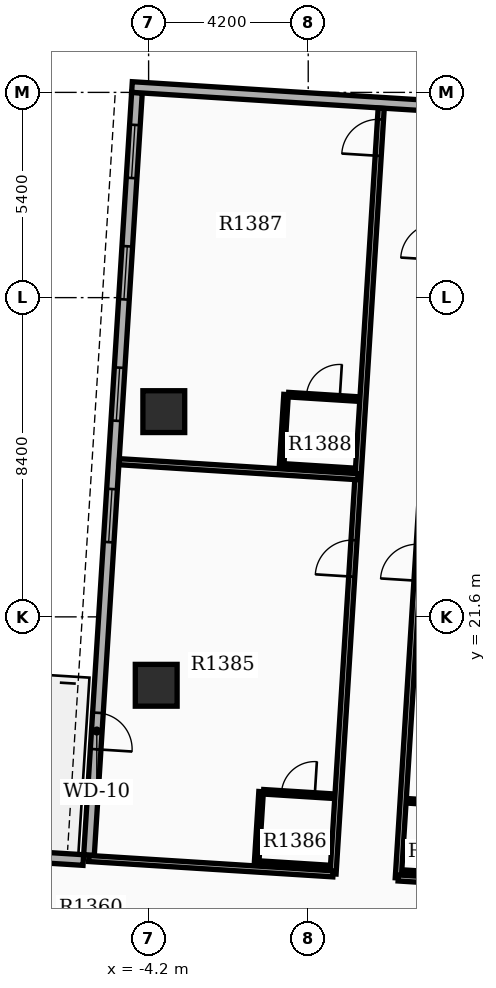
"""IFC4 building model, lengths in metres.
Left out: names, types, materials, properties, quantities, classifications, styles, units other than length and angle.
Written with IfcOpenShell. Run it as: python <this file> out.ifc"""

import sys

from ifc_helpers import new_model, si_unit, direction, frame, frame_2d, origin, origin_2d, place, context, subcontext, project, spatial, rectangle, extrude, element, fill, save


model = new_model("IFC4")
c1 = context("Model", 3, precision=1e-05, world=origin(), true_north=direction((0.0, 1.0)))
c2 = subcontext(c1, "Body", "Model", "MODEL_VIEW")
j1 = project(units=[si_unit("LENGTHUNIT", "METRE"), si_unit("PLANEANGLEUNIT", "RADIAN")], contexts=[c1])
p1 = place(None, origin())
s1 = spatial("IfcSite", under=j1, at=p1, CompositionType="ELEMENT")
p2 = place(p1, origin())
s2 = spatial("IfcBuilding", under=s1, at=p2, CompositionType="ELEMENT")
p3 = place(p2, frame((0.0, 0.0, 87.3)))
s3 = spatial("IfcBuildingStorey", under=s2, at=p3, CompositionType="ELEMENT", Elevation=87.3)
for number, where, z_axis, x_axis in (
    (1, (-4.0, 19.8, 0.0), (0.0, 0.0, 1.0), (1.0, 0.0, 0.0)),
    (2, (-3.8, 27.0, 0.0), (0.0, 0.0, 1.0), (1.0, 0.0, 0.0)),
):
    element("IfcColumn", number, at=place(p3, frame(where, z_axis=z_axis, x_axis=x_axis)), inside=s3, PredefinedType="COLUMN", context=c2, shape_type="SweptSolid", body=[
        extrude(rectangle(XDim=1.1, YDim=1.1, at=origin_2d()), origin(), (0.0, 0.0, 1.0), 3.9),
    ])
p4 = place(p3, frame((-4.507, 35.393, 0.0), z_axis=(0.0, 0.0, 1.0), x_axis=(-0.062784355807, -0.998027116198, 0.0)))
e3 = element("IfcWall", 3, at=p4, inside=s3, PredefinedType="STANDARD", context=c2, shape_type="SweptSolid", body=[
    extrude(rectangle(XDim=20.1, YDim=0.28, at=frame_2d((10.05, 0.0))), origin(), (0.0, 0.0, 1.0), 2.91),
])
p5 = place(p4, frame((0.85, 0.0, 0.8)))
e4 = element("IfcOpeningElement", 4, at=p5, cuts=e3, PredefinedType="OPENING", context=c2, shape_type="SweptSolid", body=[
    extrude(rectangle(XDim=1.4, YDim=1.6, at=frame_2d((0.7, 0.8))), frame((0.0, 0.15, 0.0), z_axis=(0.0, -1.0, 0.0), x_axis=(1.0, 0.0, 0.0)), (0.0, 0.0, 1.0), 0.3),
])
p6 = place(p4, frame((4.05, 0.0, 0.8)))
e5 = element("IfcOpeningElement", 5, at=p6, cuts=e3, PredefinedType="OPENING", context=c2, shape_type="SweptSolid", body=[
    extrude(rectangle(XDim=1.4, YDim=1.6, at=frame_2d((0.7, 0.8))), frame((0.0, 0.15, 0.0), z_axis=(0.0, -1.0, 0.0), x_axis=(1.0, 0.0, 0.0)), (0.0, 0.0, 1.0), 0.3),
])
p7 = place(p4, frame((7.25, 0.0, 0.8)))
e6 = element("IfcOpeningElement", 6, at=p7, cuts=e3, PredefinedType="OPENING", context=c2, shape_type="SweptSolid", body=[
    extrude(rectangle(XDim=1.4, YDim=1.6, at=frame_2d((0.7, 0.8))), frame((0.0, 0.15, 0.0), z_axis=(0.0, -1.0, 0.0), x_axis=(1.0, 0.0, 0.0)), (0.0, 0.0, 1.0), 0.3),
])
p8 = place(p4, frame((10.45, 0.0, 0.8)))
e7 = element("IfcOpeningElement", 7, at=p8, cuts=e3, PredefinedType="OPENING", context=c2, shape_type="SweptSolid", body=[
    extrude(rectangle(XDim=1.4, YDim=1.6, at=frame_2d((0.7, 0.8))), frame((0.0, 0.15, 0.0), z_axis=(0.0, -1.0, 0.0), x_axis=(1.0, 0.0, 0.0)), (0.0, 0.0, 1.0), 0.3),
])
p9 = place(p4, frame((16.35, 0.0, 0.0)))
e8 = element("IfcOpeningElement", 8, at=p9, cuts=e3, PredefinedType="OPENING", context=c2, shape_type="SweptSolid", body=[
    extrude(rectangle(XDim=0.96, YDim=2.1, at=frame_2d((0.48, 1.05))), frame((0.0, 0.15, 0.0), z_axis=(0.0, -1.0, 0.0), x_axis=(1.0, 0.0, 0.0)), (0.0, 0.0, 1.0), 0.3),
])
p10 = place(p3, frame((9.055, 34.68, 0.0), z_axis=(0.0, 0.0, 1.0), x_axis=(-0.998026318072, 0.062797041623, 0.0)))
e9 = element("IfcWall", 9, at=p10, inside=s3, PredefinedType="STANDARD", context=c2, shape_type="SweptSolid", body=[
    extrude(rectangle(XDim=13.72, YDim=0.28, at=frame_2d((6.86, 0.0))), origin(), (0.0, 0.0, 1.0), 2.91),
])
p11 = place(p10, frame((0.85, 0.0, 0.85)))
e10 = element("IfcOpeningElement", 10, at=p11, cuts=e9, PredefinedType="OPENING", context=c2, shape_type="SweptSolid", body=[
    extrude(rectangle(XDim=1.0, YDim=1.5, at=frame_2d((0.5, 0.75))), frame((0.0, 0.15, 0.0), z_axis=(0.0, -1.0, 0.0), x_axis=(1.0, 0.0, 0.0)), (0.0, 0.0, 1.0), 0.3),
])
p12 = place(p3, frame((-12.205, 15.597, 0.0), z_axis=(0.0, 0.0, 1.0), x_axis=(0.998024885752, -0.062819801181, 0.0)))
e11 = element("IfcWall", 11, at=p12, inside=s3, PredefinedType="STANDARD", context=c2, shape_type="SweptSolid", body=[
    extrude(rectangle(XDim=6.3, YDim=0.28, at=frame_2d((3.15, 0.0))), origin(), (0.0, 0.0, 1.0), 2.91),
])
p13 = place(p3, frame((2.37, 14.73, 0.0), z_axis=(0.0, 0.0, 1.0), x_axis=(0.062783460104, 0.998027172545, 0.0)))
e12 = element("IfcWall", 12, at=p13, inside=s3, PredefinedType="PARTITIONING", context=c2, shape_type="SweptSolid", body=[
    extrude(rectangle(XDim=20.182, YDim=0.16, at=frame_2d((10.091, 0.0))), origin(), (0.0, 0.0, 1.0), 2.9),
])
p14 = place(p13, frame((7.836, 0.0, 0.0)))
e13 = element("IfcOpeningElement", 13, at=p14, cuts=e12, PredefinedType="OPENING", context=c2, shape_type="SweptSolid", body=[
    extrude(rectangle(XDim=0.96, YDim=2.15, at=frame_2d((0.48, 1.075))), frame((0.0, 0.09, 0.0), z_axis=(0.0, -1.0, 0.0), x_axis=(1.0, 0.0, 0.0)), (0.0, 0.0, 1.0), 0.18),
])
p15 = place(p13, frame((16.296, 0.0, 0.0)))
e14 = element("IfcOpeningElement", 14, at=p15, cuts=e12, PredefinedType="OPENING", context=c2, shape_type="SweptSolid", body=[
    extrude(rectangle(XDim=0.96, YDim=2.15, at=frame_2d((0.48, 1.075))), frame((0.0, 0.09, 0.0), z_axis=(0.0, -1.0, 0.0), x_axis=(1.0, 0.0, 0.0)), (0.0, 0.0, 1.0), 0.18),
])
p16 = place(p3, frame((2.37, 14.73, 0.0), z_axis=(0.0, 0.0, 1.0), x_axis=(0.998026584059, -0.062792814175, 0.0)))
e15 = element("IfcWall", 15, at=p16, inside=s3, PredefinedType="PARTITIONING", context=c2, shape_type="SweptSolid", body=[
    extrude(rectangle(XDim=5.28, YDim=0.16, at=frame_2d((2.64, 0.0))), origin(), (0.0, 0.0, 1.0), 2.9),
])
p17 = place(p3, frame((2.637, 16.758, 0.0), z_axis=(0.0, 0.0, 1.0), x_axis=(0.998027443946, -0.062779145668, 0.0)))
e16 = element("IfcWall", 16, at=p17, inside=s3, PredefinedType="PARTITIONING", context=c2, shape_type="SweptSolid", body=[
    extrude(rectangle(XDim=1.82, YDim=0.12, at=frame_2d((0.91, 0.0))), origin(), (0.0, 0.0, 1.0), 2.9),
])
p18 = place(p17, frame((0.47, 0.0, 0.0)))
e17 = element("IfcOpeningElement", 17, at=p18, cuts=e16, PredefinedType="OPENING", context=c2, shape_type="SweptSolid", body=[
    extrude(rectangle(XDim=0.88, YDim=2.1, at=frame_2d((0.44, 1.05))), frame((0.0, 0.07, 0.0), z_axis=(0.0, -1.0, 0.0), x_axis=(1.0, 0.0, 0.0)), (0.0, 0.0, 1.0), 0.14),
])
p19 = place(p3, frame((2.519, 14.881, 0.0), z_axis=(0.0, 0.0, 1.0), x_axis=(0.998027443946, -0.062779145668, 0.0)))
e18 = element("IfcWall", 18, at=p19, inside=s3, PredefinedType="PARTITIONING", context=c2, shape_type="SweptSolid", body=[
    extrude(rectangle(XDim=1.82, YDim=0.12, at=frame_2d((0.91, 0.0))), origin(), (0.0, 0.0, 1.0), 2.9),
])
p20 = place(p3, frame((0.653, 14.838, 0.0), z_axis=(0.0, 0.0, 1.0), x_axis=(0.062783460104, 0.998027172545, 0.0)))
e19 = element("IfcWall", 19, at=p20, inside=s3, PredefinedType="PARTITIONING", context=c2, shape_type="SweptSolid", body=[
    extrude(rectangle(XDim=20.182, YDim=0.16, at=frame_2d((10.091, 0.0))), origin(), (0.0, 0.0, 1.0), 2.9),
])
p21 = place(p20, frame((7.836, 0.0, 0.0)))
e20 = element("IfcOpeningElement", 20, at=p21, cuts=e19, PredefinedType="OPENING", context=c2, shape_type="SweptSolid", body=[
    extrude(rectangle(XDim=0.96, YDim=2.15, at=frame_2d((0.48, 1.075))), frame((0.0, 0.09, 0.0), z_axis=(0.0, -1.0, 0.0), x_axis=(1.0, 0.0, 0.0)), (0.0, 0.0, 1.0), 0.18),
])
p22 = place(p20, frame((18.93, 0.0, 0.0)))
e21 = element("IfcOpeningElement", 21, at=p22, cuts=e19, PredefinedType="OPENING", context=c2, shape_type="SweptSolid", body=[
    extrude(rectangle(XDim=0.96, YDim=2.15, at=frame_2d((0.48, 1.075))), frame((0.0, 0.09, 0.0), z_axis=(0.0, -1.0, 0.0), x_axis=(1.0, 0.0, 0.0)), (0.0, 0.0, 1.0), 0.18),
])
p23 = place(p3, frame((0.653, 14.838, 0.0), z_axis=(0.0, 0.0, 1.0), x_axis=(-0.998027570366, 0.062777135888, 0.0)))
e22 = element("IfcWall", 22, at=p23, inside=s3, PredefinedType="PARTITIONING", context=c2, shape_type="SweptSolid", body=[
    extrude(rectangle(XDim=6.44, YDim=0.16, at=frame_2d((3.22, 0.0))), origin(), (0.0, 0.0, 1.0), 2.9),
])
p24 = place(p3, frame((1.31, 25.288, 0.0), z_axis=(0.0, 0.0, 1.0), x_axis=(-0.998027283173, 0.062781701496, 0.0)))
e23 = element("IfcWall", 23, at=p24, inside=s3, PredefinedType="PARTITIONING", context=c2, shape_type="SweptSolid", body=[
    extrude(rectangle(XDim=6.292, YDim=0.16, at=frame_2d((3.146, 0.0))), origin(), (0.0, 0.0, 1.0), 2.9),
])
p25 = place(p3, frame((-1.175, 16.997, 0.0), z_axis=(0.0, 0.0, 1.0), x_axis=(0.998027443946, -0.062779145668, 0.0)))
e24 = element("IfcWall", 24, at=p25, inside=s3, PredefinedType="PARTITIONING", context=c2, shape_type="SweptSolid", body=[
    extrude(rectangle(XDim=1.82, YDim=0.12, at=frame_2d((0.91, 0.0))), origin(), (0.0, 0.0, 1.0), 2.9),
])
p26 = place(p25, frame((0.47, 0.0, 0.0)))
e25 = element("IfcOpeningElement", 25, at=p26, cuts=e24, PredefinedType="OPENING", context=c2, shape_type="SweptSolid", body=[
    extrude(rectangle(XDim=0.88, YDim=2.1, at=frame_2d((0.44, 1.05))), frame((0.0, 0.07, 0.0), z_axis=(0.0, -1.0, 0.0), x_axis=(1.0, 0.0, 0.0)), (0.0, 0.0, 1.0), 0.14),
])
p27 = place(p3, frame((-1.293, 15.121, 0.0), z_axis=(0.0, 0.0, 1.0), x_axis=(0.998027443946, -0.062779145668, 0.0)))
e26 = element("IfcWall", 26, at=p27, inside=s3, PredefinedType="PARTITIONING", context=c2, shape_type="SweptSolid", body=[
    extrude(rectangle(XDim=1.82, YDim=0.12, at=frame_2d((0.91, 0.0))), origin(), (0.0, 0.0, 1.0), 2.9),
])
p28 = place(p3, frame((-1.358, 15.125, 0.0), z_axis=(0.0, 0.0, 1.0), x_axis=(0.062717813936, 0.998031300018, 0.0)))
e27 = element("IfcWall", 27, at=p28, inside=s3, PredefinedType="PARTITIONING", context=c2, shape_type="SweptSolid", body=[
    extrude(rectangle(XDim=1.88, YDim=0.12, at=frame_2d((0.94, 0.0))), origin(), (0.0, 0.0, 1.0), 2.9),
])
p29 = place(p3, frame((-0.518, 27.447, 0.0), z_axis=(0.0, 0.0, 1.0), x_axis=(0.998027443946, -0.062779145668, 0.0)))
e28 = element("IfcWall", 28, at=p29, inside=s3, PredefinedType="PARTITIONING", context=c2, shape_type="SweptSolid", body=[
    extrude(rectangle(XDim=1.82, YDim=0.12, at=frame_2d((0.91, 0.0))), origin(), (0.0, 0.0, 1.0), 2.9),
])
p30 = place(p29, frame((0.47, 0.0, 0.0)))
e29 = element("IfcOpeningElement", 29, at=p30, cuts=e28, PredefinedType="OPENING", context=c2, shape_type="SweptSolid", body=[
    extrude(rectangle(XDim=0.88, YDim=2.1, at=frame_2d((0.44, 1.05))), frame((0.0, 0.07, 0.0), z_axis=(0.0, -1.0, 0.0), x_axis=(1.0, 0.0, 0.0)), (0.0, 0.0, 1.0), 0.14),
])
p31 = place(p3, frame((-0.636, 25.57, 0.0), z_axis=(0.0, 0.0, 1.0), x_axis=(0.998027443946, -0.062779145668, 0.0)))
e30 = element("IfcWall", 30, at=p31, inside=s3, PredefinedType="PARTITIONING", context=c2, shape_type="SweptSolid", body=[
    extrude(rectangle(XDim=1.82, YDim=0.12, at=frame_2d((0.91, 0.0))), origin(), (0.0, 0.0, 1.0), 2.9),
])
p32 = place(p3, frame((-0.7, 25.574, 0.0), z_axis=(0.0, 0.0, 1.0), x_axis=(0.062725942896, 0.998030789148, 0.0)))
e31 = element("IfcWall", 31, at=p32, inside=s3, PredefinedType="PARTITIONING", context=c2, shape_type="SweptSolid", body=[
    extrude(rectangle(XDim=1.88, YDim=0.12, at=frame_2d((0.94, 0.0))), origin(), (0.0, 0.0, 1.0), 2.9),
])
p33 = place(p5, origin())
e32 = element("IfcWindow", 32, at=p33, inside=s3, PartitioningType="SINGLE_PANEL", PredefinedType="WINDOW", context=c2, shape_type="SweptSolid", body=[
    extrude(rectangle(XDim=1.4, YDim=1.6, at=frame_2d((0.7, 0.8))), frame((0.0, 0.03, 0.0), z_axis=(0.0, -1.0, 0.0), x_axis=(1.0, 0.0, 0.0)), (0.0, 0.0, 1.0), 0.06),
])
fill(e4, e32)
p34 = place(p6, origin())
e33 = element("IfcWindow", 33, at=p34, inside=s3, PartitioningType="SINGLE_PANEL", PredefinedType="WINDOW", context=c2, shape_type="SweptSolid", body=[
    extrude(rectangle(XDim=1.4, YDim=1.6, at=frame_2d((0.7, 0.8))), frame((0.0, 0.03, 0.0), z_axis=(0.0, -1.0, 0.0), x_axis=(1.0, 0.0, 0.0)), (0.0, 0.0, 1.0), 0.06),
])
fill(e5, e33)
p35 = place(p7, origin())
e34 = element("IfcWindow", 34, at=p35, inside=s3, PartitioningType="SINGLE_PANEL", PredefinedType="WINDOW", context=c2, shape_type="SweptSolid", body=[
    extrude(rectangle(XDim=1.4, YDim=1.6, at=frame_2d((0.7, 0.8))), frame((0.0, 0.03, 0.0), z_axis=(0.0, -1.0, 0.0), x_axis=(1.0, 0.0, 0.0)), (0.0, 0.0, 1.0), 0.06),
])
fill(e6, e34)
p36 = place(p8, origin())
e35 = element("IfcWindow", 35, at=p36, inside=s3, PartitioningType="SINGLE_PANEL", PredefinedType="WINDOW", context=c2, shape_type="SweptSolid", body=[
    extrude(rectangle(XDim=1.4, YDim=1.6, at=frame_2d((0.7, 0.8))), frame((0.0, 0.03, 0.0), z_axis=(0.0, -1.0, 0.0), x_axis=(1.0, 0.0, 0.0)), (0.0, 0.0, 1.0), 0.06),
])
fill(e7, e35)
p37 = place(p9, origin())
e36 = element("IfcDoor", 36, at=p37, inside=s3, OperationType="SINGLE_SWING_RIGHT", PredefinedType="DOOR", context=c2, shape_type="SweptSolid", body=[
    extrude(rectangle(XDim=0.96, YDim=2.1, at=frame_2d((0.48, 1.05))), frame((0.0, 0.025, 0.0), z_axis=(0.0, -1.0, 0.0), x_axis=(1.0, 0.0, 0.0)), (0.0, 0.0, 1.0), 0.05),
])
fill(e8, e36)
p38 = place(p14, origin())
e37 = element("IfcDoor", 37, at=p38, inside=s3, OperationType="SINGLE_SWING_LEFT", PredefinedType="DOOR", context=c2, shape_type="SweptSolid", body=[
    extrude(rectangle(XDim=0.96, YDim=2.15, at=frame_2d((0.48, 1.075))), frame((0.0, 0.025, 0.0), z_axis=(0.0, -1.0, 0.0), x_axis=(1.0, 0.0, 0.0)), (0.0, 0.0, 1.0), 0.05),
])
fill(e13, e37)
p39 = place(p21, origin())
e38 = element("IfcDoor", 38, at=p39, inside=s3, OperationType="SINGLE_SWING_LEFT", PredefinedType="DOOR", context=c2, shape_type="SweptSolid", body=[
    extrude(rectangle(XDim=0.96, YDim=2.15, at=frame_2d((0.48, 1.075))), frame((0.0, 0.025, 0.0), z_axis=(0.0, -1.0, 0.0), x_axis=(1.0, 0.0, 0.0)), (0.0, 0.0, 1.0), 0.05),
])
fill(e20, e38)
p40 = place(p26, origin())
e39 = element("IfcDoor", 39, at=p40, inside=s3, OperationType="SINGLE_SWING_RIGHT", PredefinedType="DOOR", context=c2, shape_type="SweptSolid", body=[
    extrude(rectangle(XDim=0.88, YDim=2.1, at=frame_2d((0.44, 1.05))), frame((0.0, 0.025, 0.0), z_axis=(0.0, -1.0, 0.0), x_axis=(1.0, 0.0, 0.0)), (0.0, 0.0, 1.0), 0.05),
])
fill(e25, e39)
p41 = place(p22, origin())
e40 = element("IfcDoor", 40, at=p41, inside=s3, OperationType="SINGLE_SWING_LEFT", PredefinedType="DOOR", context=c2, shape_type="SweptSolid", body=[
    extrude(rectangle(XDim=0.96, YDim=2.15, at=frame_2d((0.48, 1.075))), frame((0.0, 0.025, 0.0), z_axis=(0.0, -1.0, 0.0), x_axis=(1.0, 0.0, 0.0)), (0.0, 0.0, 1.0), 0.05),
])
fill(e21, e40)
p42 = place(p30, origin())
e41 = element("IfcDoor", 41, at=p42, inside=s3, OperationType="SINGLE_SWING_RIGHT", PredefinedType="DOOR", context=c2, shape_type="SweptSolid", body=[
    extrude(rectangle(XDim=0.88, YDim=2.1, at=frame_2d((0.44, 1.05))), frame((0.0, 0.025, 0.0), z_axis=(0.0, -1.0, 0.0), x_axis=(1.0, 0.0, 0.0)), (0.0, 0.0, 1.0), 0.05),
])
fill(e29, e41)
save(model, sys.argv[1])
